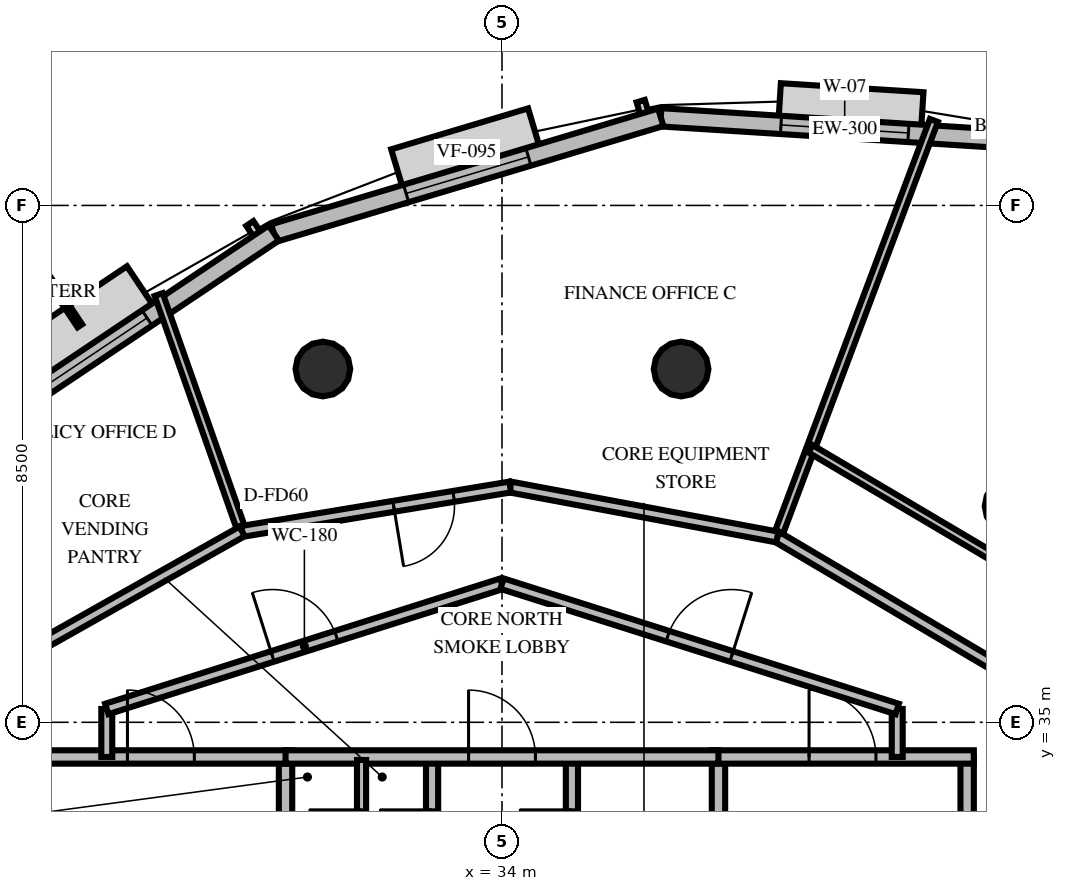
"""IFC4 building model, lengths in metres.
Left out: names, types, materials, properties, quantities, classifications, styles, units other than length and angle.
Written with IfcOpenShell. Run it as: python <this file> out.ifc"""

import sys

from ifc_helpers import new_model, si_unit, direction, frame, frame_2d, origin, origin_2d, place, context, subcontext, project, spatial, rectangle, circle, extrude, element, fill, save


model = new_model("IFC4")
c1 = context("Model", 3, precision=1e-05, world=origin(), true_north=direction((0.0, 1.0)))
c2 = subcontext(c1, "Body", "Model", "MODEL_VIEW")
j1 = project(units=[si_unit("LENGTHUNIT", "METRE"), si_unit("PLANEANGLEUNIT", "RADIAN")], contexts=[c1])
p1 = place(None, origin())
s1 = spatial("IfcSite", under=j1, at=p1, CompositionType="ELEMENT")
p2 = place(p1, origin())
s2 = spatial("IfcBuilding", under=s1, at=p2, CompositionType="ELEMENT")
p3 = place(p2, frame((0.0, 0.0, 237.6)))
s3 = spatial("IfcBuildingStorey", under=s2, at=p3, CompositionType="ELEMENT", Elevation=237.6)
for number, where, z_axis, x_axis in (
    (1, (42.389, 38.555, 0.0), (0.0, 0.0, 1.0), (1.0, 0.0, 0.0)),
    (2, (36.946, 40.81, 0.0), (0.0, 0.0, 1.0), (1.0, 0.0, 0.0)),
    (3, (31.054, 40.81, 0.0), (0.0, 0.0, 1.0), (1.0, 0.0, 0.0)),
):
    element("IfcColumn", number, at=place(p3, frame(where, z_axis=z_axis, x_axis=x_axis)), inside=s3, PredefinedType="COLUMN", context=c2, shape_type="SweptSolid", body=[
        extrude(circle(Radius=0.45, at=origin_2d()), origin(), (0.0, 0.0, 1.0), 3.6),
    ])
p4 = place(p3, frame((42.661, 44.567, 0.0), z_axis=(0.0, 0.0, 1.0), x_axis=(-0.998006550378, 0.063110422294, 0.0)))
e4 = element("IfcWall", 4, at=p4, inside=s3, PredefinedType="SOLIDWALL", context=c2, shape_type="SweptSolid", body=[
    extrude(rectangle(XDim=6.062, YDim=0.3, at=frame_2d((3.031, 0.0))), origin(), (0.0, 0.0, 1.0), 2.76),
])
p5 = place(p4, frame((1.981, 0.0, 0.8)))
e5 = element("IfcOpeningElement", 5, at=p5, cuts=e4, PredefinedType="OPENING", context=c2, shape_type="SweptSolid", body=[
    extrude(rectangle(XDim=2.1, YDim=1.85, at=frame_2d((1.05, 0.925))), frame((0.0, 0.16, 0.0), z_axis=(0.0, -1.0, 0.0), x_axis=(1.0, 0.0, 0.0)), (0.0, 0.0, 1.0), 0.32),
])
p6 = place(p3, frame((36.611, 44.949, 0.0), z_axis=(0.0, 0.0, 1.0), x_axis=(-0.958088870216, -0.286471144739, 0.0)))
e6 = element("IfcWall", 6, at=p6, inside=s3, PredefinedType="SOLIDWALL", context=c2, shape_type="SweptSolid", body=[
    extrude(rectangle(XDim=6.643, YDim=0.3, at=frame_2d((3.322, 0.0))), origin(), (0.0, 0.0, 1.0), 2.76),
])
p7 = place(p6, frame((2.272, 0.0, 0.8)))
e7 = element("IfcOpeningElement", 7, at=p7, cuts=e6, PredefinedType="OPENING", context=c2, shape_type="SweptSolid", body=[
    extrude(rectangle(XDim=2.1, YDim=1.85, at=frame_2d((1.05, 0.925))), frame((0.0, 0.16, 0.0), z_axis=(0.0, -1.0, 0.0), x_axis=(1.0, 0.0, 0.0)), (0.0, 0.0, 1.0), 0.32),
])
p8 = place(p3, frame((30.247, 43.046, 0.0), z_axis=(0.0, 0.0, 1.0), x_axis=(-0.830897686813, -0.556425227725, 0.0)))
e8 = element("IfcWall", 8, at=p8, inside=s3, PredefinedType="SOLIDWALL", context=c2, shape_type="SweptSolid", body=[
    extrude(rectangle(XDim=7.115, YDim=0.3, at=frame_2d((3.558, 0.0))), origin(), (0.0, 0.0, 1.0), 2.76),
])
p9 = place(p8, frame((2.508, 0.0, 0.8)))
e9 = element("IfcOpeningElement", 9, at=p9, cuts=e8, PredefinedType="OPENING", context=c2, shape_type="SweptSolid", body=[
    extrude(rectangle(XDim=2.1, YDim=1.85, at=frame_2d((1.05, 0.925))), frame((0.0, 0.16, 0.0), z_axis=(0.0, -1.0, 0.0), x_axis=(1.0, 0.0, 0.0)), (0.0, 0.0, 1.0), 0.32),
])
p10 = place(p3, frame((30.44, 30.05, 0.0), z_axis=(0.0, 0.0, 1.0), x_axis=(0.0, 1.0, 0.0)))
e10 = element("IfcWall", 10, at=p10, inside=s3, PredefinedType="SOLIDWALL", context=c2, shape_type="SweptSolid", body=[
    extrude(rectangle(XDim=4.38, YDim=0.22, at=frame_2d((2.19, 0.0))), origin(), (0.0, 0.0, 1.0), 2.46),
])
p11 = place(p10, frame((0.8, 0.0, 0.0)))
e11 = element("IfcOpeningElement", 11, at=p11, cuts=e10, PredefinedType="OPENING", context=c2, shape_type="SweptSolid", body=[
    extrude(rectangle(XDim=1.05, YDim=2.1, at=frame_2d((0.525, 1.05))), frame((0.0, 0.12, 0.0), z_axis=(0.0, -1.0, 0.0), x_axis=(1.0, 0.0, 0.0)), (0.0, 0.0, 1.0), 0.24),
])
p12 = place(p3, frame((26.24, 34.43, 0.0), z_axis=(0.0, 0.0, 1.0), x_axis=(1.0, 0.0, 0.0)))
e12 = element("IfcWall", 12, at=p12, inside=s3, PredefinedType="SOLIDWALL", context=c2, shape_type="SweptSolid", body=[
    extrude(rectangle(XDim=4.31, YDim=0.22, at=frame_2d((2.155, 0.0))), origin(), (0.0, 0.0, 1.0), 2.46),
])
p13 = place(p12, frame((1.6, 0.0, 0.0)))
e13 = element("IfcOpeningElement", 13, at=p13, cuts=e12, PredefinedType="OPENING", context=c2, shape_type="SweptSolid", body=[
    extrude(rectangle(XDim=1.1, YDim=2.15, at=frame_2d((0.55, 1.075))), frame((0.0, 0.12, 0.0), z_axis=(0.0, -1.0, 0.0), x_axis=(1.0, 0.0, 0.0)), (0.0, 0.0, 1.0), 0.24),
])
p14 = place(p3, frame((32.85, 30.05, 0.0), z_axis=(0.0, 0.0, 1.0), x_axis=(0.0, 1.0, 0.0)))
e14 = element("IfcWall", 14, at=p14, inside=s3, PredefinedType="SOLIDWALL", context=c2, shape_type="SweptSolid", body=[
    extrude(rectangle(XDim=4.38, YDim=0.2, at=frame_2d((2.19, 0.0))), origin(), (0.0, 0.0, 1.0), 2.46),
])
p15 = place(p14, frame((2.65, 0.0, 0.0)))
e15 = element("IfcOpeningElement", 15, at=p15, cuts=e14, PredefinedType="OPENING", context=c2, shape_type="SweptSolid", body=[
    extrude(rectangle(XDim=0.86, YDim=2.05, at=frame_2d((0.43, 1.025))), frame((0.0, 0.11, 0.0), z_axis=(0.0, -1.0, 0.0), x_axis=(1.0, 0.0, 0.0)), (0.0, 0.0, 1.0), 0.22),
])
p16 = place(p3, frame((37.56, 30.05, 0.0), z_axis=(0.0, 0.0, 1.0), x_axis=(0.0, 1.0, 0.0)))
e16 = element("IfcWall", 16, at=p16, inside=s3, PredefinedType="SOLIDWALL", context=c2, shape_type="SweptSolid", body=[
    extrude(rectangle(XDim=4.38, YDim=0.22, at=frame_2d((2.19, 0.0))), origin(), (0.0, 0.0, 1.0), 2.46),
])
p17 = place(p16, frame((0.8, 0.0, 0.0)))
e17 = element("IfcOpeningElement", 17, at=p17, cuts=e16, PredefinedType="OPENING", context=c2, shape_type="SweptSolid", body=[
    extrude(rectangle(XDim=1.05, YDim=2.1, at=frame_2d((0.525, 1.05))), frame((0.0, 0.12, 0.0), z_axis=(0.0, -1.0, 0.0), x_axis=(1.0, 0.0, 0.0)), (0.0, 0.0, 1.0), 0.24),
])
p18 = place(p3, frame((41.65, 30.05, 0.0), z_axis=(0.0, 0.0, 1.0), x_axis=(0.0, 1.0, 0.0)))
e18 = element("IfcWall", 18, at=p18, inside=s3, PredefinedType="SOLIDWALL", context=c2, shape_type="SweptSolid", body=[
    extrude(rectangle(XDim=4.38, YDim=0.22, at=frame_2d((2.19, 0.0))), origin(), (0.0, 0.0, 1.0), 2.46),
])
p19 = place(p3, frame((37.45, 34.43, 0.0), z_axis=(0.0, 0.0, 1.0), x_axis=(1.0, 0.0, 0.0)))
e19 = element("IfcWall", 19, at=p19, inside=s3, PredefinedType="SOLIDWALL", context=c2, shape_type="SweptSolid", body=[
    extrude(rectangle(XDim=4.31, YDim=0.22, at=frame_2d((2.155, 0.0))), origin(), (0.0, 0.0, 1.0), 2.46),
])
p20 = place(p19, frame((1.6, 0.0, 0.0)))
e20 = element("IfcOpeningElement", 20, at=p20, cuts=e19, PredefinedType="OPENING", context=c2, shape_type="SweptSolid", body=[
    extrude(rectangle(XDim=1.1, YDim=2.15, at=frame_2d((0.55, 1.075))), frame((0.0, 0.12, 0.0), z_axis=(0.0, -1.0, 0.0), x_axis=(1.0, 0.0, 0.0)), (0.0, 0.0, 1.0), 0.24),
])
p21 = place(p3, frame((35.15, 30.05, 0.0), z_axis=(0.0, 0.0, 1.0), x_axis=(0.0, 1.0, 0.0)))
e21 = element("IfcWall", 21, at=p21, inside=s3, PredefinedType="SOLIDWALL", context=c2, shape_type="SweptSolid", body=[
    extrude(rectangle(XDim=4.38, YDim=0.2, at=frame_2d((2.19, 0.0))), origin(), (0.0, 0.0, 1.0), 2.46),
])
p22 = place(p21, frame((2.65, 0.0, 0.0)))
e22 = element("IfcOpeningElement", 22, at=p22, cuts=e21, PredefinedType="OPENING", context=c2, shape_type="SweptSolid", body=[
    extrude(rectangle(XDim=0.86, YDim=2.05, at=frame_2d((0.43, 1.025))), frame((0.0, 0.11, 0.0), z_axis=(0.0, -1.0, 0.0), x_axis=(1.0, 0.0, 0.0)), (0.0, 0.0, 1.0), 0.22),
])
p23 = place(p3, frame((30.44, 34.43, 0.0), z_axis=(0.0, 0.0, 1.0), x_axis=(1.0, 0.0, 0.0)))
e23 = element("IfcWall", 23, at=p23, inside=s3, PredefinedType="SOLIDWALL", context=c2, shape_type="SweptSolid", body=[
    extrude(rectangle(XDim=7.12, YDim=0.22, at=frame_2d((3.56, 0.0))), origin(), (0.0, 0.0, 1.0), 2.46),
])
p24 = place(p23, frame((3.01, 0.0, 0.0)))
e24 = element("IfcOpeningElement", 24, at=p24, cuts=e23, PredefinedType="OPENING", context=c2, shape_type="SweptSolid", body=[
    extrude(rectangle(XDim=1.1, YDim=2.15, at=frame_2d((0.55, 1.075))), frame((0.0, 0.12, 0.0), z_axis=(0.0, -1.0, 0.0), x_axis=(1.0, 0.0, 0.0)), (0.0, 0.0, 1.0), 0.24),
])
p25 = place(p3, frame((31.69, 32.05, 0.0), z_axis=(0.0, 0.0, 1.0), x_axis=(0.0, 1.0, 0.0)))
e25 = element("IfcWall", 25, at=p25, inside=s3, PredefinedType="PARTITIONING", context=c2, shape_type="SweptSolid", body=[
    extrude(rectangle(XDim=2.33, YDim=0.15, at=frame_2d((1.165, 0.0))), origin(), (0.0, 0.0, 1.0), 2.46),
])
p26 = place(p25, frame((0.65, 0.0, 0.0)))
e26 = element("IfcOpeningElement", 26, at=p26, cuts=e25, PredefinedType="OPENING", context=c2, shape_type="SweptSolid", body=[
    extrude(rectangle(XDim=0.86, YDim=2.05, at=frame_2d((0.43, 1.025))), frame((0.0, 0.085, 0.0), z_axis=(0.0, -1.0, 0.0), x_axis=(1.0, 0.0, 0.0)), (0.0, 0.0, 1.0), 0.17),
])
for number, where, z_axis, x_axis in (
    (27, (27.5, 34.43, 0.0), (0.0, 0.0, 1.0), (0.0, 1.0, 0.0)),
    (28, (40.5, 35.219, 0.0), (0.0, 0.0, 1.0), (0.0, -1.0, 0.0)),
):
    element("IfcWall", number, at=place(p3, frame(where, z_axis=z_axis, x_axis=x_axis)), inside=s3, PredefinedType="PARTITIONING", context=c2, shape_type="SweptSolid", body=[
        extrude(rectangle(XDim=0.789, YDim=0.18, at=frame_2d((0.395, 0.0))), origin(), (0.0, 0.0, 1.0), 2.46),
    ])
p27 = place(p3, frame((27.5, 35.219, 0.0), z_axis=(0.0, 0.0, 1.0), x_axis=(0.953228121756, 0.302251795518, 0.0)))
e29 = element("IfcWall", 29, at=p27, inside=s3, PredefinedType="PARTITIONING", context=c2, shape_type="SweptSolid", body=[
    extrude(rectangle(XDim=6.819, YDim=0.18, at=frame_2d((3.409, 0.0))), origin(), (0.0, 0.0, 1.0), 2.46),
])
p28 = place(p27, frame((2.86, 0.0, 0.0)))
e30 = element("IfcOpeningElement", 30, at=p28, cuts=e29, PredefinedType="OPENING", context=c2, shape_type="SweptSolid", body=[
    extrude(rectangle(XDim=1.1, YDim=2.15, at=frame_2d((0.55, 1.075))), frame((0.0, 0.1, 0.0), z_axis=(0.0, -1.0, 0.0), x_axis=(1.0, 0.0, 0.0)), (0.0, 0.0, 1.0), 0.2),
])
p29 = place(p3, frame((34.0, 37.28, 0.0), z_axis=(0.0, 0.0, 1.0), x_axis=(0.953228121756, -0.302251795518, 0.0)))
e31 = element("IfcWall", 31, at=p29, inside=s3, PredefinedType="PARTITIONING", context=c2, shape_type="SweptSolid", body=[
    extrude(rectangle(XDim=6.819, YDim=0.18, at=frame_2d((3.409, 0.0))), origin(), (0.0, 0.0, 1.0), 2.46),
])
p30 = place(p29, frame((2.86, 0.0, 0.0)))
e32 = element("IfcOpeningElement", 32, at=p30, cuts=e31, PredefinedType="OPENING", context=c2, shape_type="SweptSolid", body=[
    extrude(rectangle(XDim=1.1, YDim=2.15, at=frame_2d((0.55, 1.075))), frame((0.0, 0.1, 0.0), z_axis=(0.0, -1.0, 0.0), x_axis=(1.0, 0.0, 0.0)), (0.0, 0.0, 1.0), 0.2),
])
p31 = place(p3, frame((38.528, 38.047, 0.0), z_axis=(0.0, 0.0, 1.0), x_axis=(0.351821633052, 0.936067058771, 0.0)))
e33 = element("IfcWall", 33, at=p31, inside=s3, PredefinedType="PARTITIONING", context=c2, shape_type="SweptSolid", body=[
    extrude(rectangle(XDim=7.318, YDim=0.14, at=frame_2d((3.659, 0.0))), origin(), (0.0, 0.0, 1.0), 2.46),
])
p32 = place(p3, frame((42.375, 35.772, 0.0), z_axis=(0.0, 0.0, 1.0), x_axis=(-0.860724202021, 0.509071554946, 0.0)))
e34 = element("IfcWall", 34, at=p32, inside=s3, PredefinedType="PARTITIONING", context=c2, shape_type="SweptSolid", body=[
    extrude(rectangle(XDim=4.47, YDim=0.18, at=frame_2d((2.235, 0.0))), origin(), (0.0, 0.0, 1.0), 2.46),
])
p33 = place(p3, frame((43.384, 36.949, 0.0), z_axis=(0.0, 0.0, 1.0), x_axis=(-0.860748876633, 0.509029833483, 0.0)))
e35 = element("IfcWall", 35, at=p33, inside=s3, PredefinedType="PARTITIONING", context=c2, shape_type="SweptSolid", body=[
    extrude(rectangle(XDim=5.008, YDim=0.14, at=frame_2d((2.504, 0.0))), origin(), (0.0, 0.0, 1.0), 2.46),
])
p34 = place(p3, frame((29.725, 38.139, 0.0), z_axis=(0.0, 0.0, 1.0), x_axis=(-0.332179937454, 0.94321603525, 0.0)))
e36 = element("IfcWall", 36, at=p34, inside=s3, PredefinedType="PARTITIONING", context=c2, shape_type="SweptSolid", body=[
    extrude(rectangle(XDim=4.13, YDim=0.14, at=frame_2d((2.065, 0.0))), origin(), (0.0, 0.0, 1.0), 2.46),
])
p35 = place(p3, frame((38.528, 38.047, 0.0), z_axis=(0.0, 0.0, 1.0), x_axis=(-0.982933965097, 0.183958746079, 0.0)))
e37 = element("IfcWall", 37, at=p35, inside=s3, PredefinedType="PARTITIONING", context=c2, shape_type="SweptSolid", body=[
    extrude(rectangle(XDim=4.47, YDim=0.18, at=frame_2d((2.235, 0.0))), origin(), (0.0, 0.0, 1.0), 2.46),
])
p36 = place(p3, frame((34.135, 38.869, 0.0), z_axis=(0.0, 0.0, 1.0), x_axis=(-0.986573435215, -0.163318268813, 0.0)))
e38 = element("IfcWall", 38, at=p36, inside=s3, PredefinedType="PARTITIONING", context=c2, shape_type="SweptSolid", body=[
    extrude(rectangle(XDim=4.47, YDim=0.18, at=frame_2d((2.235, 0.0))), origin(), (0.0, 0.0, 1.0), 2.46),
])
p37 = place(p36, frame((0.942, 0.0, 0.0)))
e39 = element("IfcOpeningElement", 39, at=p37, cuts=e38, PredefinedType="OPENING", context=c2, shape_type="SweptSolid", body=[
    extrude(rectangle(XDim=1.0, YDim=2.15, at=frame_2d((0.5, 1.075))), frame((0.0, 0.1, 0.0), z_axis=(0.0, -1.0, 0.0), x_axis=(1.0, 0.0, 0.0)), (0.0, 0.0, 1.0), 0.2),
])
p38 = place(p3, frame((29.725, 38.139, 0.0), z_axis=(0.0, 0.0, 1.0), x_axis=(-0.871198932887, -0.490930157291, 0.0)))
e40 = element("IfcWall", 40, at=p38, inside=s3, PredefinedType="PARTITIONING", context=c2, shape_type="SweptSolid", body=[
    extrude(rectangle(XDim=4.47, YDim=0.18, at=frame_2d((2.235, 0.0))), origin(), (0.0, 0.0, 1.0), 2.46),
])
p39 = place(p5, origin())
e41 = element("IfcWindow", 41, at=p39, inside=s3, PartitioningType="SINGLE_PANEL", PredefinedType="WINDOW", context=c2, shape_type="SweptSolid", body=[
    extrude(rectangle(XDim=2.1, YDim=1.85, at=frame_2d((1.05, 0.925))), frame((0.0, 0.03, 0.0), z_axis=(0.0, -1.0, 0.0), x_axis=(1.0, 0.0, 0.0)), (0.0, 0.0, 1.0), 0.06),
])
fill(e5, e41)
p40 = place(p7, origin())
e42 = element("IfcWindow", 42, at=p40, inside=s3, PartitioningType="SINGLE_PANEL", PredefinedType="WINDOW", context=c2, shape_type="SweptSolid", body=[
    extrude(rectangle(XDim=2.1, YDim=1.85, at=frame_2d((1.05, 0.925))), frame((0.0, 0.03, 0.0), z_axis=(0.0, -1.0, 0.0), x_axis=(1.0, 0.0, 0.0)), (0.0, 0.0, 1.0), 0.06),
])
fill(e7, e42)
p41 = place(p9, origin())
e43 = element("IfcWindow", 43, at=p41, inside=s3, PartitioningType="SINGLE_PANEL", PredefinedType="WINDOW", context=c2, shape_type="SweptSolid", body=[
    extrude(rectangle(XDim=2.1, YDim=1.85, at=frame_2d((1.05, 0.925))), frame((0.0, 0.03, 0.0), z_axis=(0.0, -1.0, 0.0), x_axis=(1.0, 0.0, 0.0)), (0.0, 0.0, 1.0), 0.06),
])
fill(e9, e43)
p42 = place(p13, origin())
e44 = element("IfcDoor", 44, at=p42, inside=s3, OperationType="SINGLE_SWING_LEFT", PredefinedType="DOOR", context=c2, shape_type="SweptSolid", body=[
    extrude(rectangle(XDim=1.1, YDim=2.15, at=frame_2d((0.55, 1.075))), frame((0.0, 0.025, 0.0), z_axis=(0.0, -1.0, 0.0), x_axis=(1.0, 0.0, 0.0)), (0.0, 0.0, 1.0), 0.05),
])
fill(e13, e44)
p43 = place(p15, origin())
e45 = element("IfcDoor", 45, at=p43, inside=s3, OperationType="SINGLE_SWING_RIGHT", PredefinedType="TRAPDOOR", context=c2, shape_type="SweptSolid", body=[
    extrude(rectangle(XDim=0.86, YDim=2.05, at=frame_2d((0.43, 1.025))), frame((0.0, 0.025, 0.0), z_axis=(0.0, -1.0, 0.0), x_axis=(1.0, 0.0, 0.0)), (0.0, 0.0, 1.0), 0.05),
])
fill(e15, e45)
p44 = place(p20, origin())
e46 = element("IfcDoor", 46, at=p44, inside=s3, OperationType="SINGLE_SWING_LEFT", PredefinedType="DOOR", context=c2, shape_type="SweptSolid", body=[
    extrude(rectangle(XDim=1.1, YDim=2.15, at=frame_2d((0.55, 1.075))), frame((0.0, 0.025, 0.0), z_axis=(0.0, -1.0, 0.0), x_axis=(1.0, 0.0, 0.0)), (0.0, 0.0, 1.0), 0.05),
])
fill(e20, e46)
p45 = place(p22, origin())
e47 = element("IfcDoor", 47, at=p45, inside=s3, OperationType="SINGLE_SWING_RIGHT", PredefinedType="TRAPDOOR", context=c2, shape_type="SweptSolid", body=[
    extrude(rectangle(XDim=0.86, YDim=2.05, at=frame_2d((0.43, 1.025))), frame((0.0, 0.025, 0.0), z_axis=(0.0, -1.0, 0.0), x_axis=(1.0, 0.0, 0.0)), (0.0, 0.0, 1.0), 0.05),
])
fill(e22, e47)
p46 = place(p24, origin())
e48 = element("IfcDoor", 48, at=p46, inside=s3, OperationType="SINGLE_SWING_LEFT", PredefinedType="DOOR", context=c2, shape_type="SweptSolid", body=[
    extrude(rectangle(XDim=1.1, YDim=2.15, at=frame_2d((0.55, 1.075))), frame((0.0, 0.025, 0.0), z_axis=(0.0, -1.0, 0.0), x_axis=(1.0, 0.0, 0.0)), (0.0, 0.0, 1.0), 0.05),
])
fill(e24, e48)
p47 = place(p26, origin())
e49 = element("IfcDoor", 49, at=p47, inside=s3, OperationType="SINGLE_SWING_RIGHT", PredefinedType="TRAPDOOR", context=c2, shape_type="SweptSolid", body=[
    extrude(rectangle(XDim=0.86, YDim=2.05, at=frame_2d((0.43, 1.025))), frame((0.0, 0.025, 0.0), z_axis=(0.0, -1.0, 0.0), x_axis=(1.0, 0.0, 0.0)), (0.0, 0.0, 1.0), 0.05),
])
fill(e26, e49)
p48 = place(p28, origin())
e50 = element("IfcDoor", 50, at=p48, inside=s3, OperationType="SINGLE_SWING_LEFT", PredefinedType="DOOR", context=c2, shape_type="SweptSolid", body=[
    extrude(rectangle(XDim=1.1, YDim=2.15, at=frame_2d((0.55, 1.075))), frame((0.0, 0.025, 0.0), z_axis=(0.0, -1.0, 0.0), x_axis=(1.0, 0.0, 0.0)), (0.0, 0.0, 1.0), 0.05),
])
fill(e30, e50)
p49 = place(p30, origin())
e51 = element("IfcDoor", 51, at=p49, inside=s3, OperationType="SINGLE_SWING_RIGHT", PredefinedType="DOOR", context=c2, shape_type="SweptSolid", body=[
    extrude(rectangle(XDim=1.1, YDim=2.15, at=frame_2d((0.55, 1.075))), frame((0.0, 0.025, 0.0), z_axis=(0.0, -1.0, 0.0), x_axis=(1.0, 0.0, 0.0)), (0.0, 0.0, 1.0), 0.05),
])
fill(e32, e51)
p50 = place(p37, origin())
e52 = element("IfcDoor", 52, at=p50, inside=s3, OperationType="SINGLE_SWING_RIGHT", PredefinedType="DOOR", context=c2, shape_type="SweptSolid", body=[
    extrude(rectangle(XDim=1.0, YDim=2.15, at=frame_2d((0.5, 1.075))), frame((0.0, 0.025, 0.0), z_axis=(0.0, -1.0, 0.0), x_axis=(1.0, 0.0, 0.0)), (0.0, 0.0, 1.0), 0.05),
])
fill(e39, e52)
save(model, sys.argv[1])
